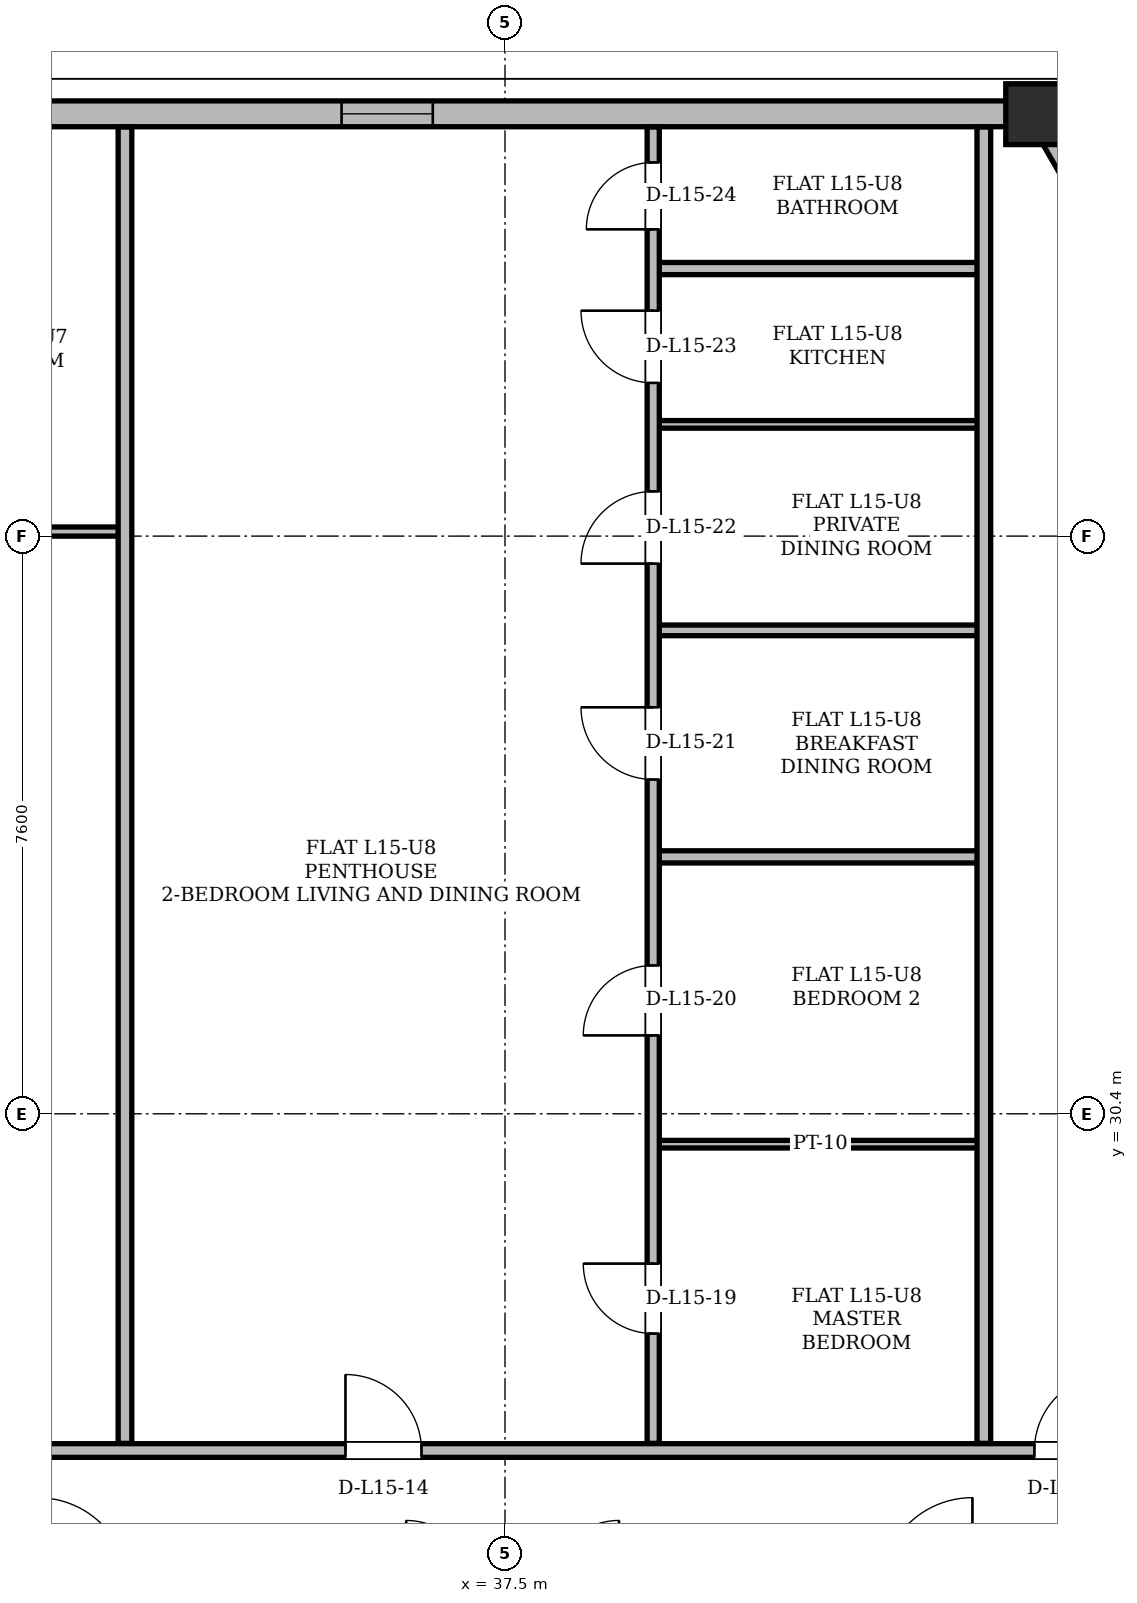
"""IFC4 building model, lengths in metres.
Left out: names, types, materials, properties, quantities, classifications, styles, units other than length and angle.
Written with IfcOpenShell. Run it as: python <this file> out.ifc"""

import sys

from ifc_helpers import new_model, si_unit, direction, frame, frame_2d, origin, origin_2d, place, context, subcontext, project, spatial, rectangle, hollow_rectangle, extrude, element, fill, save


model = new_model("IFC4")
c1 = context("Model", 3, precision=1e-05, world=origin(), true_north=direction((0.0, 1.0)))
c2 = subcontext(c1, "Body", "Model", "MODEL_VIEW")
j1 = project(units=[si_unit("LENGTHUNIT", "METRE"), si_unit("PLANEANGLEUNIT", "RADIAN")], contexts=[c1])
p1 = place(None, origin())
s1 = spatial("IfcSite", under=j1, at=p1, CompositionType="ELEMENT")
p2 = place(p1, origin())
s2 = spatial("IfcBuilding", under=s1, at=p2, CompositionType="ELEMENT")
p3 = place(p2, frame((0.0, 0.0, 59.7)))
s3 = spatial("IfcBuildingStorey", under=s2, at=p3, CompositionType="ELEMENT", Elevation=59.7)
p4 = place(p3, frame((44.542, 43.556, 0.005), z_axis=(-0.029494809359, -0.002650455219, 0.999561419478), x_axis=(0.089501110996, -0.995986722367, 0.0)))
e1 = element("IfcColumn", 1, at=p4, inside=s3, PredefinedType="COLUMN", context=c2, shape_type="SweptSolid", body=[
    extrude(hollow_rectangle(XDim=0.8, YDim=0.8, WallThickness=0.065, at=origin_2d()), origin(), (0.0, 0.0, 1.0), 3.592),
])
p5 = place(p3, frame((61.334, 14.47, 0.0), z_axis=(0.0, 0.0, 1.0), x_axis=(-0.499999743921, 0.866025551632, 0.0)))
e2 = element("IfcWall", 2, at=p5, inside=s3, PredefinedType="SOLIDWALL", context=c2, shape_type="SweptSolid", body=[
    extrude(rectangle(XDim=33.585, YDim=0.34, at=frame_2d((16.792, 0.0))), origin(), (0.0, 0.0, 1.0), 2.494),
])
p6 = place(p5, frame((7.615, 0.0, 0.0)))
e3 = element("IfcOpeningElement", 3, at=p6, cuts=e2, PredefinedType="OPENING", context=c2, shape_type="SweptSolid", body=[
    extrude(rectangle(XDim=1.5, YDim=2.2, at=frame_2d((0.75, 1.1))), frame((0.0, 0.17, 0.0), z_axis=(0.0, -1.0, 0.0), x_axis=(1.0, 0.0, 0.0)), (0.0, 0.0, 1.0), 0.34),
])
p7 = place(p5, frame((25.926, 0.0, 0.0)))
e4 = element("IfcOpeningElement", 4, at=p7, cuts=e2, PredefinedType="OPENING", context=c2, shape_type="SweptSolid", body=[
    extrude(rectangle(XDim=1.5, YDim=2.2, at=frame_2d((0.75, 1.1))), frame((0.0, 0.17, 0.0), z_axis=(0.0, -1.0, 0.0), x_axis=(1.0, 0.0, 0.0)), (0.0, 0.0, 1.0), 0.34),
])
p8 = place(p5, frame((1.544, 0.0, 0.85)))
e5 = element("IfcOpeningElement", 5, at=p8, cuts=e2, PredefinedType="OPENING", context=c2, shape_type="SweptSolid", body=[
    extrude(rectangle(XDim=1.4, YDim=1.534, at=frame_2d((0.7, 0.767))), frame((0.0, 0.17, 0.0), z_axis=(0.0, -1.0, 0.0), x_axis=(1.0, 0.0, 0.0)), (0.0, 0.0, 1.0), 0.34),
])
p9 = place(p5, frame((20.338, 0.0, 0.85)))
e6 = element("IfcOpeningElement", 6, at=p9, cuts=e2, PredefinedType="OPENING", context=c2, shape_type="SweptSolid", body=[
    extrude(rectangle(XDim=1.2, YDim=1.48, at=frame_2d((0.6, 0.74))), frame((0.0, 0.17, 0.0), z_axis=(0.0, -1.0, 0.0), x_axis=(1.0, 0.0, 0.0)), (0.0, 0.0, 1.0), 0.34),
])
p10 = place(p5, frame((29.519, 0.0, 0.85)))
e7 = element("IfcOpeningElement", 7, at=p10, cuts=e2, PredefinedType="OPENING", context=c2, shape_type="SweptSolid", body=[
    extrude(rectangle(XDim=2.2, YDim=1.534, at=frame_2d((1.1, 0.767))), frame((0.0, 0.17, 0.0), z_axis=(0.0, -1.0, 0.0), x_axis=(1.0, 0.0, 0.0)), (0.0, 0.0, 1.0), 0.34),
])
p11 = place(p5, frame((14.912, 0.0, 0.85)))
e8 = element("IfcOpeningElement", 8, at=p11, cuts=e2, PredefinedType="OPENING", context=c2, shape_type="SweptSolid", body=[
    extrude(rectangle(XDim=1.2, YDim=1.48, at=frame_2d((0.6, 0.74))), frame((0.0, 0.17, 0.0), z_axis=(0.0, -1.0, 0.0), x_axis=(1.0, 0.0, 0.0)), (0.0, 0.0, 1.0), 0.34),
])
p12 = place(p5, frame((17.664, 0.0, 0.85)))
e9 = element("IfcOpeningElement", 9, at=p12, cuts=e2, PredefinedType="OPENING", context=c2, shape_type="SweptSolid", body=[
    extrude(rectangle(XDim=1.2, YDim=1.48, at=frame_2d((0.6, 0.74))), frame((0.0, 0.17, 0.0), z_axis=(0.0, -1.0, 0.0), x_axis=(1.0, 0.0, 0.0)), (0.0, 0.0, 1.0), 0.34),
])
p13 = place(p3, frame((44.542, 43.556, 0.0), z_axis=(0.0, 0.0, 1.0), x_axis=(-1.0, 0.0, 0.0)))
e10 = element("IfcWall", 10, at=p13, inside=s3, PredefinedType="SOLIDWALL", context=c2, shape_type="SweptSolid", body=[
    extrude(rectangle(XDim=14.083, YDim=0.34, at=frame_2d((7.042, 0.0))), origin(), (0.0, 0.0, 1.0), 2.494),
])
p14 = place(p13, frame((7.992, 0.0, 0.85)))
e11 = element("IfcOpeningElement", 11, at=p14, cuts=e10, PredefinedType="OPENING", context=c2, shape_type="SweptSolid", body=[
    extrude(rectangle(XDim=1.2, YDim=1.48, at=frame_2d((0.6, 0.74))), frame((0.0, 0.17, 0.0), z_axis=(0.0, -1.0, 0.0), x_axis=(1.0, 0.0, 0.0)), (0.0, 0.0, 1.0), 0.34),
])
p15 = place(p3, frame((27.55, 25.97, 0.0), z_axis=(0.0, 0.0, 1.0), x_axis=(1.0, 0.0, 0.0)))
e12 = element("IfcWall", 12, at=p15, inside=s3, PredefinedType="PARTITIONING", context=c2, shape_type="SweptSolid", body=[
    extrude(rectangle(XDim=19.9, YDim=0.18, at=frame_2d((9.95, 0.0))), origin(), (0.0, 0.0, 1.0), 2.738),
])
p16 = place(p15, frame((2.07, 0.0, 0.0)))
e13 = element("IfcOpeningElement", 13, at=p16, cuts=e12, PredefinedType="OPENING", context=c2, shape_type="SweptSolid", body=[
    extrude(rectangle(XDim=1.0, YDim=2.18, at=frame_2d((0.5, 1.09))), frame((0.0, 0.09, 0.0), z_axis=(0.0, -1.0, 0.0), x_axis=(1.0, 0.0, 0.0)), (0.0, 0.0, 1.0), 0.18),
])
p17 = place(p15, frame((7.851, 0.0, 0.0)))
e14 = element("IfcOpeningElement", 14, at=p17, cuts=e12, PredefinedType="OPENING", context=c2, shape_type="SweptSolid", body=[
    extrude(rectangle(XDim=1.0, YDim=2.18, at=frame_2d((0.5, 1.09))), frame((0.0, 0.09, 0.0), z_axis=(0.0, -1.0, 0.0), x_axis=(1.0, 0.0, 0.0)), (0.0, 0.0, 1.0), 0.18),
])
p18 = place(p15, frame((16.916, 0.0, 0.0)))
e15 = element("IfcOpeningElement", 15, at=p18, cuts=e12, PredefinedType="OPENING", context=c2, shape_type="SweptSolid", body=[
    extrude(rectangle(XDim=1.0, YDim=2.18, at=frame_2d((0.5, 1.09))), frame((0.0, 0.09, 0.0), z_axis=(0.0, -1.0, 0.0), x_axis=(1.0, 0.0, 0.0)), (0.0, 0.0, 1.0), 0.18),
])
p19 = place(p3, frame((39.45, 30.0, 0.0), z_axis=(0.0, 0.0, 1.0), x_axis=(1.0, 0.0, 0.0)))
e16 = element("IfcWall", 16, at=p19, inside=s3, PredefinedType="PARTITIONING", context=c2, shape_type="SweptSolid", body=[
    extrude(rectangle(XDim=4.4, YDim=0.1, at=frame_2d((2.2, 0.0))), origin(), (0.0, 0.0, 1.0), 3.36),
])
p20 = place(p3, frame((39.45, 33.78, 0.0), z_axis=(0.0, 0.0, 1.0), x_axis=(1.0, 0.0, 0.0)))
e17 = element("IfcWall", 17, at=p20, inside=s3, PredefinedType="PARTITIONING", context=c2, shape_type="SweptSolid", body=[
    extrude(rectangle(XDim=4.4, YDim=0.16, at=frame_2d((2.2, 0.0))), origin(), (0.0, 0.0, 1.0), 3.36),
])
p21 = place(p3, frame((39.45, 36.76, 0.0), z_axis=(0.0, 0.0, 1.0), x_axis=(1.0, 0.0, 0.0)))
e18 = element("IfcWall", 18, at=p21, inside=s3, PredefinedType="PARTITIONING", context=c2, shape_type="SweptSolid", body=[
    extrude(rectangle(XDim=4.4, YDim=0.14, at=frame_2d((2.2, 0.0))), origin(), (0.0, 0.0, 1.0), 3.36),
])
p22 = place(p3, frame((27.486, 38.06, 0.0), z_axis=(0.0, 0.0, 1.0), x_axis=(1.0, 0.0, 0.0)))
e19 = element("IfcWall", 19, at=p22, inside=s3, PredefinedType="PARTITIONING", context=c2, shape_type="SweptSolid", body=[
    extrude(rectangle(XDim=5.096, YDim=0.12, at=frame_2d((2.548, 0.0))), origin(), (0.0, 0.0, 1.0), 2.738),
])
p23 = place(p22, frame((2.099, 0.0, 0.0)))
e20 = element("IfcOpeningElement", 20, at=p23, cuts=e19, PredefinedType="OPENING", context=c2, shape_type="SweptSolid", body=[
    extrude(rectangle(XDim=0.88, YDim=2.08, at=frame_2d((0.44, 1.04))), frame((0.0, 0.06, 0.0), z_axis=(0.0, -1.0, 0.0), x_axis=(1.0, 0.0, 0.0)), (0.0, 0.0, 1.0), 0.12),
])
p24 = place(p3, frame((39.45, 39.47, 0.0), z_axis=(0.0, 0.0, 1.0), x_axis=(1.0, 0.0, 0.0)))
e21 = element("IfcWall", 21, at=p24, inside=s3, PredefinedType="PARTITIONING", context=c2, shape_type="SweptSolid", body=[
    extrude(rectangle(XDim=4.4, YDim=0.1, at=frame_2d((2.2, 0.0))), origin(), (0.0, 0.0, 1.0), 3.36),
])
p25 = place(p3, frame((39.45, 41.52, 0.0), z_axis=(0.0, 0.0, 1.0), x_axis=(1.0, 0.0, 0.0)))
e22 = element("IfcWall", 22, at=p25, inside=s3, PredefinedType="PARTITIONING", context=c2, shape_type="SweptSolid", body=[
    extrude(rectangle(XDim=4.4, YDim=0.16, at=frame_2d((2.2, 0.0))), origin(), (0.0, 0.0, 1.0), 3.36),
])
p26 = place(p3, frame((32.5, 26.064, 0.0), z_axis=(0.0, 0.0, 1.0), x_axis=(0.0, 1.0, 0.0)))
e23 = element("IfcWall", 23, at=p26, inside=s3, PredefinedType="PARTITIONING", context=c2, shape_type="SweptSolid", body=[
    extrude(rectangle(XDim=17.318, YDim=0.18, at=frame_2d((8.659, 0.0))), origin(), (0.0, 0.0, 1.0), 3.36),
])
p27 = place(p3, frame((39.45, 26.064, 0.0), z_axis=(0.0, 0.0, 1.0), x_axis=(0.0, 1.0, 0.0)))
e24 = element("IfcWall", 24, at=p27, inside=s3, PredefinedType="PARTITIONING", context=c2, shape_type="SweptSolid", body=[
    extrude(rectangle(XDim=17.318, YDim=0.16, at=frame_2d((8.659, 0.0))), origin(), (0.0, 0.0, 1.0), 3.36),
])
p28 = place(p27, frame((1.445, 0.0, 0.0)))
e25 = element("IfcOpeningElement", 25, at=p28, cuts=e24, PredefinedType="OPENING", context=c2, shape_type="SweptSolid", body=[
    extrude(rectangle(XDim=0.92, YDim=2.12, at=frame_2d((0.46, 1.06))), frame((0.0, 0.08, 0.0), z_axis=(0.0, -1.0, 0.0), x_axis=(1.0, 0.0, 0.0)), (0.0, 0.0, 1.0), 0.16),
])
p29 = place(p27, frame((5.367, 0.0, 0.0)))
e26 = element("IfcOpeningElement", 26, at=p29, cuts=e24, PredefinedType="OPENING", context=c2, shape_type="SweptSolid", body=[
    extrude(rectangle(XDim=0.92, YDim=2.12, at=frame_2d((0.46, 1.06))), frame((0.0, 0.08, 0.0), z_axis=(0.0, -1.0, 0.0), x_axis=(1.0, 0.0, 0.0)), (0.0, 0.0, 1.0), 0.16),
])
p30 = place(p27, frame((8.734, 0.0, 0.0)))
e27 = element("IfcOpeningElement", 27, at=p30, cuts=e24, PredefinedType="OPENING", context=c2, shape_type="SweptSolid", body=[
    extrude(rectangle(XDim=0.95, YDim=2.1, at=frame_2d((0.475, 1.05))), frame((0.0, 0.08, 0.0), z_axis=(0.0, -1.0, 0.0), x_axis=(1.0, 0.0, 0.0)), (0.0, 0.0, 1.0), 0.16),
])
p31 = place(p27, frame((11.574, 0.0, 0.0)))
e28 = element("IfcOpeningElement", 28, at=p31, cuts=e24, PredefinedType="OPENING", context=c2, shape_type="SweptSolid", body=[
    extrude(rectangle(XDim=0.95, YDim=2.1, at=frame_2d((0.475, 1.05))), frame((0.0, 0.08, 0.0), z_axis=(0.0, -1.0, 0.0), x_axis=(1.0, 0.0, 0.0)), (0.0, 0.0, 1.0), 0.16),
])
p32 = place(p27, frame((13.952, 0.0, 0.0)))
e29 = element("IfcOpeningElement", 29, at=p32, cuts=e24, PredefinedType="OPENING", context=c2, shape_type="SweptSolid", body=[
    extrude(rectangle(XDim=0.95, YDim=2.1, at=frame_2d((0.475, 1.05))), frame((0.0, 0.08, 0.0), z_axis=(0.0, -1.0, 0.0), x_axis=(1.0, 0.0, 0.0)), (0.0, 0.0, 1.0), 0.16),
])
p33 = place(p27, frame((15.972, 0.0, 0.0)))
e30 = element("IfcOpeningElement", 30, at=p33, cuts=e24, PredefinedType="OPENING", context=c2, shape_type="SweptSolid", body=[
    extrude(rectangle(XDim=0.88, YDim=2.08, at=frame_2d((0.44, 1.04))), frame((0.0, 0.08, 0.0), z_axis=(0.0, -1.0, 0.0), x_axis=(1.0, 0.0, 0.0)), (0.0, 0.0, 1.0), 0.16),
])
p34 = place(p3, frame((43.8, 26.064, 0.0), z_axis=(0.0, 0.0, 1.0), x_axis=(0.0, 1.0, 0.0)))
e31 = element("IfcWall", 31, at=p34, inside=s3, PredefinedType="PARTITIONING", context=c2, shape_type="SweptSolid", body=[
    extrude(rectangle(XDim=17.318, YDim=0.18, at=frame_2d((8.659, 0.0))), origin(), (0.0, 0.0, 1.0), 3.36),
])
p35 = place(p14, origin())
e32 = element("IfcWindow", 32, at=p35, inside=s3, PartitioningType="SINGLE_PANEL", PredefinedType="WINDOW", context=c2, shape_type="SweptSolid", body=[
    extrude(rectangle(XDim=1.2, YDim=1.48, at=frame_2d((0.6, 0.74))), frame((0.0, 0.03, 0.0), z_axis=(0.0, -1.0, 0.0), x_axis=(1.0, 0.0, 0.0)), (0.0, 0.0, 1.0), 0.06),
])
fill(e11, e32)
p36 = place(p17, origin())
e33 = element("IfcDoor", 33, at=p36, inside=s3, OperationType="SINGLE_SWING_LEFT", PredefinedType="DOOR", context=c2, shape_type="SweptSolid", body=[
    extrude(rectangle(XDim=1.0, YDim=2.18, at=frame_2d((0.5, 1.09))), frame((0.0, 0.025, 0.0), z_axis=(0.0, -1.0, 0.0), x_axis=(1.0, 0.0, 0.0)), (0.0, 0.0, 1.0), 0.05),
])
fill(e14, e33)
p37 = place(p18, origin())
e34 = element("IfcDoor", 34, at=p37, inside=s3, OperationType="SINGLE_SWING_RIGHT", PredefinedType="DOOR", context=c2, shape_type="SweptSolid", body=[
    extrude(rectangle(XDim=1.0, YDim=2.18, at=frame_2d((0.5, 1.09))), frame((0.0, 0.025, 0.0), z_axis=(0.0, -1.0, 0.0), x_axis=(1.0, 0.0, 0.0)), (0.0, 0.0, 1.0), 0.05),
])
fill(e15, e34)
p38 = place(p28, origin())
e35 = element("IfcDoor", 35, at=p38, inside=s3, OperationType="SINGLE_SWING_RIGHT", PredefinedType="DOOR", context=c2, shape_type="SweptSolid", body=[
    extrude(rectangle(XDim=0.92, YDim=2.12, at=frame_2d((0.46, 1.06))), frame((0.0, 0.025, 0.0), z_axis=(0.0, -1.0, 0.0), x_axis=(1.0, 0.0, 0.0)), (0.0, 0.0, 1.0), 0.05),
])
fill(e25, e35)
p39 = place(p29, origin())
e36 = element("IfcDoor", 36, at=p39, inside=s3, OperationType="SINGLE_SWING_LEFT", PredefinedType="DOOR", context=c2, shape_type="SweptSolid", body=[
    extrude(rectangle(XDim=0.92, YDim=2.12, at=frame_2d((0.46, 1.06))), frame((0.0, 0.025, 0.0), z_axis=(0.0, -1.0, 0.0), x_axis=(1.0, 0.0, 0.0)), (0.0, 0.0, 1.0), 0.05),
])
fill(e26, e36)
p40 = place(p30, origin())
e37 = element("IfcDoor", 37, at=p40, inside=s3, OperationType="SINGLE_SWING_RIGHT", PredefinedType="DOOR", context=c2, shape_type="SweptSolid", body=[
    extrude(rectangle(XDim=0.95, YDim=2.1, at=frame_2d((0.475, 1.05))), frame((0.0, 0.025, 0.0), z_axis=(0.0, -1.0, 0.0), x_axis=(1.0, 0.0, 0.0)), (0.0, 0.0, 1.0), 0.05),
])
fill(e27, e37)
p41 = place(p31, origin())
e38 = element("IfcDoor", 38, at=p41, inside=s3, OperationType="SINGLE_SWING_LEFT", PredefinedType="DOOR", context=c2, shape_type="SweptSolid", body=[
    extrude(rectangle(XDim=0.95, YDim=2.1, at=frame_2d((0.475, 1.05))), frame((0.0, 0.025, 0.0), z_axis=(0.0, -1.0, 0.0), x_axis=(1.0, 0.0, 0.0)), (0.0, 0.0, 1.0), 0.05),
])
fill(e28, e38)
p42 = place(p32, origin())
e39 = element("IfcDoor", 39, at=p42, inside=s3, OperationType="SINGLE_SWING_RIGHT", PredefinedType="DOOR", context=c2, shape_type="SweptSolid", body=[
    extrude(rectangle(XDim=0.95, YDim=2.1, at=frame_2d((0.475, 1.05))), frame((0.0, 0.025, 0.0), z_axis=(0.0, -1.0, 0.0), x_axis=(1.0, 0.0, 0.0)), (0.0, 0.0, 1.0), 0.05),
])
fill(e29, e39)
p43 = place(p33, origin())
e40 = element("IfcDoor", 40, at=p43, inside=s3, OperationType="SINGLE_SWING_LEFT", PredefinedType="DOOR", context=c2, shape_type="SweptSolid", body=[
    extrude(rectangle(XDim=0.88, YDim=2.08, at=frame_2d((0.44, 1.04))), frame((0.0, 0.025, 0.0), z_axis=(0.0, -1.0, 0.0), x_axis=(1.0, 0.0, 0.0)), (0.0, 0.0, 1.0), 0.05),
])
fill(e30, e40)
save(model, sys.argv[1])
